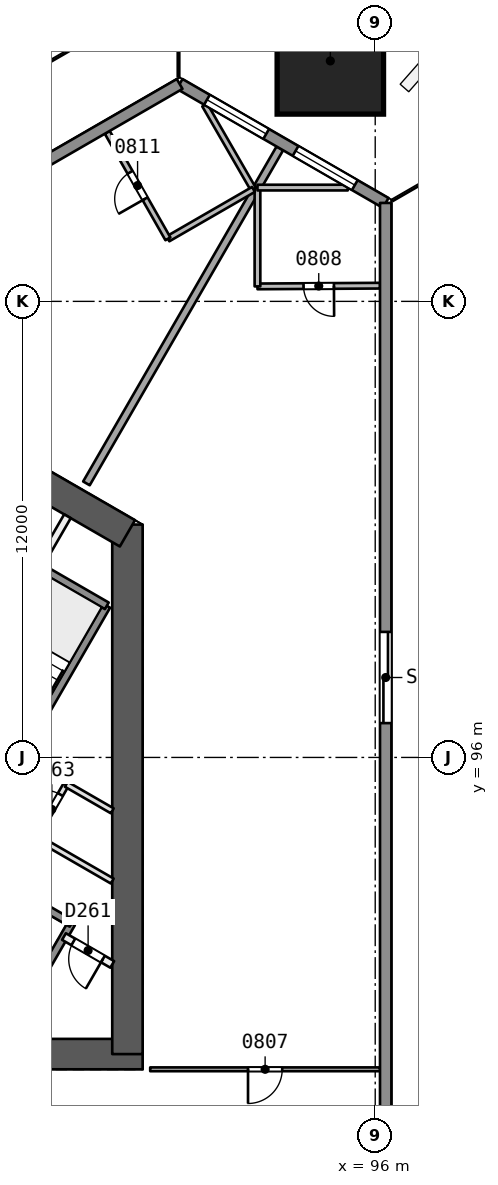
"""IFC4 building model, lengths in metres.
Left out: names, types, materials, properties, quantities, classifications, styles, units other than length and angle.
Written with IfcOpenShell. Run it as: python <this file> out.ifc"""

import sys

from ifc_helpers import new_model, si_unit, direction, frame, frame_2d, origin, origin_2d, place, context, subcontext, project, spatial, rectangle, extrude, element, fill, save


model = new_model("IFC4")
c1 = context("Model", 3, precision=1e-05, world=origin(), true_north=direction((0.0, 1.0)))
c2 = subcontext(c1, "Body", "Model", "MODEL_VIEW")
j1 = project(units=[si_unit("LENGTHUNIT", "METRE"), si_unit("PLANEANGLEUNIT", "RADIAN")], contexts=[c1])
p1 = place(None, origin())
s1 = spatial("IfcSite", under=j1, at=p1, CompositionType="ELEMENT")
p2 = place(p1, origin())
s2 = spatial("IfcBuilding", under=s1, at=p2, CompositionType="ELEMENT")
p3 = place(p2, frame((0.0, 0.0, 41.1)))
s3 = spatial("IfcBuildingStorey", under=s2, at=p3, CompositionType="ELEMENT", Elevation=41.1)
p4 = place(p3, frame((79.731, 88.194, 0.0), z_axis=(0.0, 0.0, 1.0), x_axis=(1.0, 0.0, 0.0)))
e1 = element("IfcWall", 1, at=p4, inside=s3, PredefinedType="SHEAR", context=c2, shape_type="SweptSolid", body=[
    extrude(rectangle(XDim=10.149, YDim=0.8, at=frame_2d((5.074, 0.0))), origin(), (0.0, 0.0, 1.0), 3.7),
])
p5 = place(p4, frame((0.719, 0.0, 0.0)))
e2 = element("IfcOpeningElement", 2, at=p5, cuts=e1, PredefinedType="OPENING", context=c2, shape_type="SweptSolid", body=[
    extrude(rectangle(XDim=1.2, YDim=2.1, at=frame_2d((0.6, 1.05))), frame((0.0, 0.411, 0.0), z_axis=(0.0, -1.0, 0.0), x_axis=(1.0, 0.0, 0.0)), (0.0, 0.0, 1.0), 0.821),
])
p6 = place(p3, frame((89.48, 88.194, 0.0), z_axis=(0.0, 0.0, 1.0), x_axis=(0.0, 1.0, 0.0)))
e3 = element("IfcWall", 3, at=p6, inside=s3, PredefinedType="SHEAR", context=c2, shape_type="SweptSolid", body=[
    extrude(rectangle(XDim=13.933, YDim=0.8, at=frame_2d((6.967, 0.0))), origin(), (0.0, 0.0, 1.0), 3.7),
])
p7 = place(p3, frame((89.48, 101.897, 0.0), z_axis=(0.0, 0.0, 1.0), x_axis=(-0.866034355626, 0.499984494636, 0.0)))
e4 = element("IfcWall", 4, at=p7, inside=s3, PredefinedType="SHEAR", context=c2, shape_type="SweptSolid", body=[
    extrude(rectangle(XDim=3.414, YDim=0.8, at=frame_2d((1.707, 0.0))), origin(), (0.0, 0.0, 1.0), 3.7),
])
p8 = place(p3, frame((94.84, 114.364, 0.0), z_axis=(-0.017607037296, -0.030466109479, 0.999380712447), x_axis=(0.86581098392, -0.500371202332, 2.457e-09)))
e5 = element("IfcColumn", 5, at=p8, inside=s3, PredefinedType="COLUMN", context=c2, shape_type="SweptSolid", body=[
    extrude(rectangle(XDim=2.8, YDim=2.8, at=origin_2d()), origin(), (0.0, 0.0, 1.0), 3.702),
])
p9 = place(p3, frame((96.127, 87.794, 0.0), z_axis=(0.0, 0.0, 1.0), x_axis=(-1.0, 0.0, 0.0)))
e6 = element("IfcWall", 6, at=p9, inside=s3, PredefinedType="PARTITIONING", context=c2, shape_type="SweptSolid", body=[
    extrude(rectangle(XDim=6.048, YDim=0.1, at=frame_2d((3.024, 0.0))), origin(), (0.0, 0.0, 1.0), 3.2),
])
p10 = place(p9, frame((2.574, 0.0, 0.0)))
e7 = element("IfcOpeningElement", 7, at=p10, cuts=e6, PredefinedType="OPENING", context=c2, shape_type="SweptSolid", body=[
    extrude(rectangle(XDim=0.9, YDim=2.1, at=frame_2d((0.45, 1.05))), frame((0.0, 0.061, 0.0), z_axis=(0.0, -1.0, 0.0), x_axis=(1.0, 0.0, 0.0)), (0.0, 0.0, 1.0), 0.121),
])
p11 = place(p3, frame((96.127, 108.413, 0.0), z_axis=(0.0, 0.0, 1.0), x_axis=(-0.999982570839, -0.005904067862, 0.0)))
e8 = element("IfcWall", 8, at=p11, inside=s3, PredefinedType="PARTITIONING", context=c2, shape_type="SweptSolid", body=[
    extrude(rectangle(XDim=3.225, YDim=0.15, at=frame_2d((1.613, 0.0))), origin(), (0.0, 0.0, 1.0), 3.2),
])
p12 = place(p11, frame((1.213, 0.0, 0.0)))
e9 = element("IfcOpeningElement", 9, at=p12, cuts=e8, PredefinedType="OPENING", context=c2, shape_type="SweptSolid", body=[
    extrude(rectangle(XDim=0.8, YDim=2.1, at=frame_2d((0.4, 1.05))), frame((0.0, 0.085, 0.0), z_axis=(0.0, -1.0, 0.0), x_axis=(1.0, 0.0, 0.0)), (0.0, 0.0, 1.0), 0.171),
])
p13 = place(p3, frame((92.902, 108.394, 0.0), z_axis=(0.0, 0.0, 1.0), x_axis=(0.0, 1.0, 0.0)))
e10 = element("IfcWall", 10, at=p13, inside=s3, PredefinedType="PARTITIONING", context=c2, shape_type="SweptSolid", body=[
    extrude(rectangle(XDim=2.6, YDim=0.15, at=frame_2d((1.3, 0.0))), origin(), (0.0, 0.0, 1.0), 3.2),
])
p14 = place(p3, frame((92.902, 110.994, 0.0), z_axis=(0.0, 0.0, 1.0), x_axis=(1.0, 0.0, 0.0)))
e11 = element("IfcWall", 11, at=p14, inside=s3, PredefinedType="PARTITIONING", context=c2, shape_type="SweptSolid", body=[
    extrude(rectangle(XDim=2.376, YDim=0.15, at=frame_2d((1.188, 0.0))), origin(), (0.0, 0.0, 1.0), 3.2),
])
p15 = place(p3, frame((93.49, 112.026, 0.0), z_axis=(0.0, 0.0, 1.0), x_axis=(-0.499993053251, -0.866029414455, 0.0)))
e12 = element("IfcWall", 12, at=p15, inside=s3, PredefinedType="PARTITIONING", context=c2, shape_type="SweptSolid", body=[
    extrude(rectangle(XDim=10.179, YDim=0.2, at=frame_2d((5.089, 0.0))), origin(), (0.0, 0.0, 1.0), 3.2),
])
p16 = place(p3, frame((91.514, 113.167, 0.0), z_axis=(0.0, 0.0, 1.0), x_axis=(0.499936653632, -0.866061973738, 0.0)))
e13 = element("IfcWall", 13, at=p16, inside=s3, PredefinedType="PARTITIONING", context=c2, shape_type="SweptSolid", body=[
    extrude(rectangle(XDim=2.565, YDim=0.15, at=frame_2d((1.283, 0.0))), origin(), (0.0, 0.0, 1.0), 3.2),
])
p17 = place(p3, frame((92.797, 110.946, 0.0), z_axis=(0.0, 0.0, 1.0), x_axis=(-0.866021400173, -0.500006934395, 0.0)))
e14 = element("IfcWall", 14, at=p17, inside=s3, PredefinedType="PARTITIONING", context=c2, shape_type="SweptSolid", body=[
    extrude(rectangle(XDim=2.6, YDim=0.15, at=frame_2d((1.3, 0.0))), origin(), (0.0, 0.0, 1.0), 3.2),
])
p18 = place(p3, frame((90.545, 109.646, 0.0), z_axis=(0.0, 0.0, 1.0), x_axis=(-0.494883074799, 0.868959574593, 0.0)))
e15 = element("IfcWall", 15, at=p18, inside=s3, PredefinedType="PARTITIONING", context=c2, shape_type="SweptSolid", body=[
    extrude(rectangle(XDim=3.225, YDim=0.15, at=frame_2d((1.613, 0.0))), origin(), (0.0, 0.0, 1.0), 3.2),
])
p19 = place(p18, frame((1.213, 0.0, 0.0)))
e16 = element("IfcOpeningElement", 16, at=p19, cuts=e15, PredefinedType="OPENING", context=c2, shape_type="SweptSolid", body=[
    extrude(rectangle(XDim=0.8, YDim=2.1, at=frame_2d((0.4, 1.05))), frame((0.0, 0.085, 0.0), z_axis=(0.0, -1.0, 0.0), x_axis=(1.0, 0.0, 0.0)), (0.0, 0.0, 1.0), 0.171),
])
p20 = place(p3, frame((90.854, 113.72, 0.0), z_axis=(0.0, 0.0, 1.0), x_axis=(0.866021938441, -0.500006002103, 0.0)))
e17 = element("IfcWall", 17, at=p20, inside=s3, PredefinedType="SOLIDWALL", context=c2, shape_type="SweptSolid", body=[
    extrude(rectangle(XDim=6.261, YDim=0.3, at=frame_2d((3.13, 0.0))), origin(), (0.0, 0.0, 1.0), 3.2),
])
p21 = place(p20, frame((3.522, 0.0, 0.9)))
e18 = element("IfcOpeningElement", 18, at=p21, cuts=e17, PredefinedType="OPENING", context=c2, shape_type="SweptSolid", body=[
    extrude(rectangle(XDim=1.8, YDim=1.5, at=frame_2d((0.9, 0.75))), frame((0.0, 0.161, 0.0), z_axis=(0.0, -1.0, 0.0), x_axis=(1.0, 0.0, 0.0)), (0.0, 0.0, 1.0), 0.321),
])
p22 = place(p20, frame((0.83, 0.0, 0.9)))
e19 = element("IfcOpeningElement", 19, at=p22, cuts=e17, PredefinedType="OPENING", context=c2, shape_type="SweptSolid", body=[
    extrude(rectangle(XDim=1.8, YDim=1.5, at=frame_2d((0.9, 0.75))), frame((0.0, 0.161, 0.0), z_axis=(0.0, -1.0, 0.0), x_axis=(1.0, 0.0, 0.0)), (0.0, 0.0, 1.0), 0.321),
])
p23 = place(p3, frame((96.276, 110.59, 0.0), z_axis=(0.0, 0.0, 1.0), x_axis=(0.0, -1.0, 0.0)))
e20 = element("IfcWall", 20, at=p23, inside=s3, PredefinedType="SOLIDWALL", context=c2, shape_type="SweptSolid", body=[
    extrude(rectangle(XDim=61.18, YDim=0.3, at=frame_2d((30.59, 0.0))), origin(), (0.0, 0.0, 1.0), 3.2),
])
p24 = place(p23, frame((29.702, 0.0, 0.0)))
e21 = element("IfcOpeningElement", 21, at=p24, cuts=e20, PredefinedType="OPENING", context=c2, shape_type="SweptSolid", body=[
    extrude(rectangle(XDim=2.4, YDim=2.4, at=frame_2d((1.2, 1.2))), frame((0.0, 0.161, 0.0), z_axis=(0.0, -1.0, 0.0), x_axis=(1.0, 0.0, 0.0)), (0.0, 0.0, 1.0), 0.321),
])
p25 = place(p23, frame((34.846, 0.0, 0.0)))
e22 = element("IfcOpeningElement", 22, at=p25, cuts=e20, PredefinedType="OPENING", context=c2, shape_type="SweptSolid", body=[
    extrude(rectangle(XDim=2.4, YDim=2.4, at=frame_2d((1.2, 1.2))), frame((0.0, 0.161, 0.0), z_axis=(0.0, -1.0, 0.0), x_axis=(1.0, 0.0, 0.0)), (0.0, 0.0, 1.0), 0.321),
])
p26 = place(p23, frame((47.439, 0.0, 0.0)))
e23 = element("IfcOpeningElement", 23, at=p26, cuts=e20, PredefinedType="OPENING", context=c2, shape_type="SweptSolid", body=[
    extrude(rectangle(XDim=2.4, YDim=2.4, at=frame_2d((1.2, 1.2))), frame((0.0, 0.161, 0.0), z_axis=(0.0, -1.0, 0.0), x_axis=(1.0, 0.0, 0.0)), (0.0, 0.0, 1.0), 0.321),
])
p27 = place(p23, frame((24.246, 0.0, 0.0)))
e24 = element("IfcOpeningElement", 24, at=p27, cuts=e20, PredefinedType="OPENING", context=c2, shape_type="SweptSolid", body=[
    extrude(rectangle(XDim=2.4, YDim=2.4, at=frame_2d((1.2, 1.2))), frame((0.0, 0.161, 0.0), z_axis=(0.0, -1.0, 0.0), x_axis=(1.0, 0.0, 0.0)), (0.0, 0.0, 1.0), 0.321),
])
p28 = place(p23, frame((11.287, 0.0, 0.0)))
e25 = element("IfcOpeningElement", 25, at=p28, cuts=e20, PredefinedType="OPENING", context=c2, shape_type="SweptSolid", body=[
    extrude(rectangle(XDim=2.4, YDim=2.4, at=frame_2d((1.2, 1.2))), frame((0.0, 0.161, 0.0), z_axis=(0.0, -1.0, 0.0), x_axis=(1.0, 0.0, 0.0)), (0.0, 0.0, 1.0), 0.321),
])
p29 = place(p3, frame((37.87, 83.13, 0.0), z_axis=(0.0, 0.0, 1.0), x_axis=(0.866026630825, 0.499997874697, 0.0)))
e26 = element("IfcWall", 26, at=p29, inside=s3, PredefinedType="SOLIDWALL", context=c2, shape_type="SweptSolid", body=[
    extrude(rectangle(XDim=61.18, YDim=0.3, at=frame_2d((30.59, 0.0))), origin(), (0.0, 0.0, 1.0), 3.2),
])
p30 = place(p29, frame((12.181, 0.0, 0.0)))
e27 = element("IfcOpeningElement", 27, at=p30, cuts=e26, PredefinedType="OPENING", context=c2, shape_type="SweptSolid", body=[
    extrude(rectangle(XDim=2.4, YDim=2.4, at=frame_2d((1.2, 1.2))), frame((0.0, 0.161, 0.0), z_axis=(0.0, -1.0, 0.0), x_axis=(1.0, 0.0, 0.0)), (0.0, 0.0, 1.0), 0.321),
])
p31 = place(p29, frame((34.846, 0.0, 0.0)))
e28 = element("IfcOpeningElement", 28, at=p31, cuts=e26, PredefinedType="OPENING", context=c2, shape_type="SweptSolid", body=[
    extrude(rectangle(XDim=2.4, YDim=2.4, at=frame_2d((1.2, 1.2))), frame((0.0, 0.161, 0.0), z_axis=(0.0, -1.0, 0.0), x_axis=(1.0, 0.0, 0.0)), (0.0, 0.0, 1.0), 0.321),
])
p32 = place(p29, frame((47.439, 0.0, 0.0)))
e29 = element("IfcOpeningElement", 29, at=p32, cuts=e26, PredefinedType="OPENING", context=c2, shape_type="SweptSolid", body=[
    extrude(rectangle(XDim=2.4, YDim=2.4, at=frame_2d((1.2, 1.2))), frame((0.0, 0.161, 0.0), z_axis=(0.0, -1.0, 0.0), x_axis=(1.0, 0.0, 0.0)), (0.0, 0.0, 1.0), 0.321),
])
p33 = place(p29, frame((29.078, 0.0, 0.0)))
e30 = element("IfcOpeningElement", 30, at=p33, cuts=e26, PredefinedType="OPENING", context=c2, shape_type="SweptSolid", body=[
    extrude(rectangle(XDim=2.4, YDim=2.4, at=frame_2d((1.2, 1.2))), frame((0.0, 0.161, 0.0), z_axis=(0.0, -1.0, 0.0), x_axis=(1.0, 0.0, 0.0)), (0.0, 0.0, 1.0), 0.321),
])
p34 = place(p3, frame((86.77, 89.486, 0.0), z_axis=(0.0, 0.0, 1.0), x_axis=(0.499961042966, 0.86604789447, 0.0)))
e31 = element("IfcWall", 31, at=p34, inside=s3, PredefinedType="SOLIDWALL", context=c2, shape_type="SweptSolid", body=[
    extrude(rectangle(XDim=2.48, YDim=0.2, at=frame_2d((1.24, 0.0))), origin(), (0.0, 0.0, 1.0), 3.2),
])
p35 = place(p3, frame((87.071, 93.908, 0.0), z_axis=(0.0, 0.0, 1.0), x_axis=(0.499995408039, 0.866028054938, 0.0)))
e32 = element("IfcWall", 32, at=p35, inside=s3, PredefinedType="PARTITIONING", context=c2, shape_type="SweptSolid", body=[
    extrude(rectangle(XDim=1.6, YDim=0.15, at=frame_2d((0.8, 0.0))), origin(), (0.0, 0.0, 1.0), 3.2),
])
p36 = place(p35, frame((0.387, 0.0, 0.0)))
e33 = element("IfcOpeningElement", 33, at=p36, cuts=e32, PredefinedType="OPENING", context=c2, shape_type="SweptSolid", body=[
    extrude(rectangle(XDim=0.9, YDim=2.1, at=frame_2d((0.45, 1.05))), frame((0.0, 0.085, 0.0), z_axis=(0.0, -1.0, 0.0), x_axis=(1.0, 0.0, 0.0)), (0.0, 0.0, 1.0), 0.171),
])
p37 = place(p3, frame((85.087, 93.321, 0.0), z_axis=(0.0, 0.0, 1.0), x_axis=(0.500019787375, 0.866013979237, 0.0)))
e34 = element("IfcWall", 34, at=p37, inside=s3, PredefinedType="SOLIDWALL", context=c2, shape_type="SweptSolid", body=[
    extrude(rectangle(XDim=7.7, YDim=0.2, at=frame_2d((3.85, 0.0))), origin(), (0.0, 0.0, 1.0), 3.2),
])
p38 = place(p3, frame((87.09, 100.94, 0.0), z_axis=(0.0, 0.0, 1.0), x_axis=(0.499956811548, 0.866050337213, 0.0)))
e35 = element("IfcWall", 35, at=p38, inside=s3, PredefinedType="PARTITIONING", context=c2, shape_type="SweptSolid", body=[
    extrude(rectangle(XDim=1.623, YDim=0.2, at=frame_2d((0.812, 0.0))), origin(), (0.0, 0.0, 1.0), 3.2),
])
p39 = place(p3, frame((89.08, 90.554, 0.0), z_axis=(0.0, 0.0, 1.0), x_axis=(-0.866022048785, 0.500005810984, 0.0)))
e36 = element("IfcWall", 36, at=p39, inside=s3, PredefinedType="PARTITIONING", context=c2, shape_type="SweptSolid", body=[
    extrude(rectangle(XDim=1.467, YDim=0.2, at=frame_2d((0.733, 0.0))), origin(), (0.0, 0.0, 1.0), 3.2),
])
p40 = place(p39, frame((0.283, 0.0, 0.0)))
e37 = element("IfcOpeningElement", 37, at=p40, cuts=e36, PredefinedType="OPENING", context=c2, shape_type="SweptSolid", body=[
    extrude(rectangle(XDim=0.9, YDim=2.1, at=frame_2d((0.45, 1.05))), frame((0.0, 0.11, 0.0), z_axis=(0.0, -1.0, 0.0), x_axis=(1.0, 0.0, 0.0)), (0.0, 0.0, 1.0), 0.221),
])
p41 = place(p3, frame((88.01, 91.634, 0.0), z_axis=(0.0, 0.0, 1.0), x_axis=(-0.866024315419, 0.5000018851, 0.0)))
e38 = element("IfcWall", 38, at=p41, inside=s3, PredefinedType="SOLIDWALL", context=c2, shape_type="SweptSolid", body=[
    extrude(rectangle(XDim=9.0, YDim=0.2, at=frame_2d((4.5, 0.0))), origin(), (0.0, 0.0, 1.0), 3.2),
])
p42 = place(p3, frame((89.08, 92.748, 0.0), z_axis=(0.0, 0.0, 1.0), x_axis=(-0.866026103983, 0.499998787219, 0.0)))
e39 = element("IfcWall", 39, at=p42, inside=s3, PredefinedType="PARTITIONING", context=c2, shape_type="SweptSolid", body=[
    extrude(rectangle(XDim=2.32, YDim=0.15, at=frame_2d((1.16, 0.0))), origin(), (0.0, 0.0, 1.0), 3.2),
])
p43 = place(p3, frame((89.08, 94.595, 0.0), z_axis=(0.0, 0.0, 1.0), x_axis=(-0.866028321769, 0.499994945868, 0.0)))
e40 = element("IfcWall", 40, at=p43, inside=s3, PredefinedType="PARTITIONING", context=c2, shape_type="SweptSolid", body=[
    extrude(rectangle(XDim=1.396, YDim=0.15, at=frame_2d((0.698, 0.0))), origin(), (0.0, 0.0, 1.0), 3.2),
])
p44 = place(p3, frame((88.937, 99.99, 0.0), z_axis=(0.0, 0.0, 1.0), x_axis=(-0.866004344652, 0.500036473714, 0.0)))
e41 = element("IfcWall", 41, at=p44, inside=s3, PredefinedType="SOLIDWALL", context=c2, shape_type="SweptSolid", body=[
    extrude(rectangle(XDim=4.15, YDim=0.2, at=frame_2d((2.075, 0.0))), origin(), (0.0, 0.0, 1.0), 3.2),
])
p45 = place(p10, origin())
e42 = element("IfcDoor", 42, at=p45, inside=s3, OperationType="SINGLE_SWING_RIGHT", PredefinedType="NOTDEFINED", context=c2, shape_type="SweptSolid", body=[
    extrude(rectangle(XDim=0.9, YDim=2.1, at=frame_2d((0.45, 1.05))), frame((0.0, 0.025, 0.0), z_axis=(0.0, -1.0, 0.0), x_axis=(1.0, 0.0, 0.0)), (0.0, 0.0, 1.0), 0.05),
])
fill(e7, e42)
p46 = place(p12, origin())
e43 = element("IfcDoor", 43, at=p46, inside=s3, OperationType="SINGLE_SWING_LEFT", PredefinedType="NOTDEFINED", context=c2, shape_type="SweptSolid", body=[
    extrude(rectangle(XDim=0.8, YDim=2.1, at=frame_2d((0.4, 1.05))), frame((0.0, 0.025, 0.0), z_axis=(0.0, -1.0, 0.0), x_axis=(1.0, 0.0, 0.0)), (0.0, 0.0, 1.0), 0.05),
])
fill(e9, e43)
p47 = place(p19, origin())
e44 = element("IfcDoor", 44, at=p47, inside=s3, OperationType="SINGLE_SWING_LEFT", PredefinedType="NOTDEFINED", context=c2, shape_type="SweptSolid", body=[
    extrude(rectangle(XDim=0.8, YDim=2.1, at=frame_2d((0.4, 1.05))), frame((0.0, 0.025, 0.0), z_axis=(0.0, -1.0, 0.0), x_axis=(1.0, 0.0, 0.0)), (0.0, 0.0, 1.0), 0.05),
])
fill(e16, e44)
p48 = place(p21, origin())
e45 = element("IfcWindow", 45, at=p48, inside=s3, PartitioningType="SINGLE_PANEL", PredefinedType="WINDOW", context=c2, shape_type="SweptSolid", body=[
    extrude(rectangle(XDim=1.8, YDim=1.5, at=frame_2d((0.9, 0.75))), frame((0.0, 0.03, 0.0), z_axis=(0.0, -1.0, 0.0), x_axis=(1.0, 0.0, 0.0)), (0.0, 0.0, 1.0), 0.06),
])
fill(e18, e45)
p49 = place(p22, origin())
e46 = element("IfcWindow", 46, at=p49, inside=s3, PartitioningType="SINGLE_PANEL", PredefinedType="WINDOW", context=c2, shape_type="SweptSolid", body=[
    extrude(rectangle(XDim=1.8, YDim=1.5, at=frame_2d((0.9, 0.75))), frame((0.0, 0.03, 0.0), z_axis=(0.0, -1.0, 0.0), x_axis=(1.0, 0.0, 0.0)), (0.0, 0.0, 1.0), 0.06),
])
fill(e19, e46)
p50 = place(p28, origin())
e47 = element("IfcDoor", 47, at=p50, inside=s3, OperationType="SLIDING_TO_LEFT", PredefinedType="NOTDEFINED", context=c2, shape_type="SweptSolid", body=[
    extrude(rectangle(XDim=2.4, YDim=2.4, at=frame_2d((1.2, 1.2))), frame((0.0, 0.025, 0.0), z_axis=(0.0, -1.0, 0.0), x_axis=(1.0, 0.0, 0.0)), (0.0, 0.0, 1.0), 0.05),
])
fill(e25, e47)
p51 = place(p40, origin())
e48 = element("IfcDoor", 48, at=p51, inside=s3, OperationType="SINGLE_SWING_LEFT", PredefinedType="NOTDEFINED", context=c2, shape_type="SweptSolid", body=[
    extrude(rectangle(XDim=0.9, YDim=2.1, at=frame_2d((0.45, 1.05))), frame((0.0, 0.025, 0.0), z_axis=(0.0, -1.0, 0.0), x_axis=(1.0, 0.0, 0.0)), (0.0, 0.0, 1.0), 0.05),
])
fill(e37, e48)
p52 = place(p36, origin())
e49 = element("IfcDoor", 49, at=p52, inside=s3, OperationType="SINGLE_SWING_LEFT", PredefinedType="NOTDEFINED", context=c2, shape_type="SweptSolid", body=[
    extrude(rectangle(XDim=0.9, YDim=2.1, at=frame_2d((0.45, 1.05))), frame((0.0, 0.025, 0.0), z_axis=(0.0, -1.0, 0.0), x_axis=(1.0, 0.0, 0.0)), (0.0, 0.0, 1.0), 0.05),
])
fill(e33, e49)
save(model, sys.argv[1])
